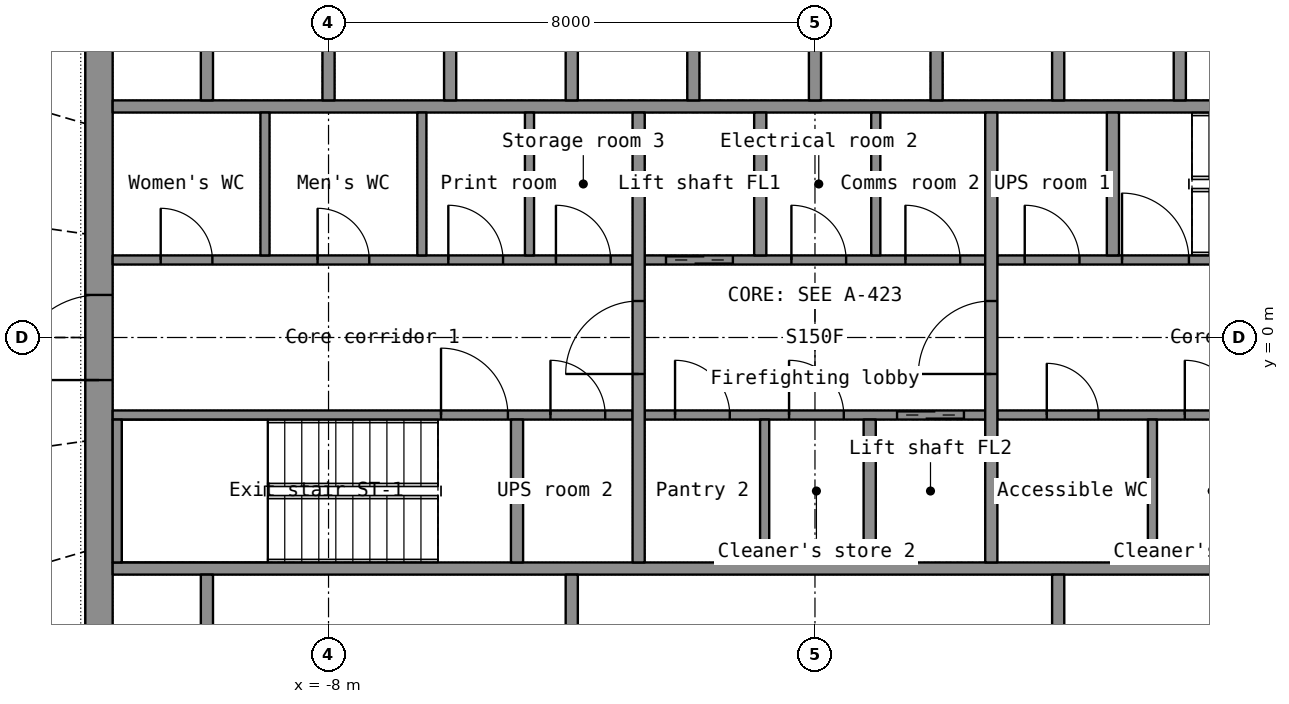
"""IFC4 building model, lengths in metres.
Left out: names, types, materials, properties, quantities, classifications, styles, units other than length and angle.
Written with IfcOpenShell. Run it as: python <this file> out.ifc"""

import sys

from ifc_helpers import new_model, si_unit, direction, frame, frame_2d, origin, place, context, subcontext, project, spatial, rectangle, extrude, element, fill, save


model = new_model("IFC4")
c1 = context("Model", 3, precision=1e-05, world=origin(), true_north=direction((0.0, 1.0)))
c2 = subcontext(c1, "Body", "Model", "MODEL_VIEW")
j1 = project(units=[si_unit("LENGTHUNIT", "METRE"), si_unit("PLANEANGLEUNIT", "RADIAN")], contexts=[c1])
p1 = place(None, origin())
s1 = spatial("IfcSite", under=j1, at=p1, CompositionType="ELEMENT")
p2 = place(p1, origin())
s2 = spatial("IfcBuilding", under=s1, at=p2, CompositionType="ELEMENT")
p3 = place(p2, frame((0.0, 0.0, 168.2)))
s3 = spatial("IfcBuildingStorey", under=s2, at=p3, CompositionType="ELEMENT", Elevation=168.2)
p4 = place(p3, frame((-11.775, -7.2, 0.0), z_axis=(0.0, 0.0, 1.0), x_axis=(0.0, 1.0, 0.0)))
e1 = element("IfcWall", 1, at=p4, inside=s3, PredefinedType="SHEAR", context=c2, shape_type="SweptSolid", body=[
    extrude(rectangle(XDim=14.4, YDim=0.45, at=frame_2d((7.2, 0.0))), origin(), (0.0, 0.0, 1.0), 3.3),
])
p5 = place(p4, frame((6.5, 0.0, 0.0)))
e2 = element("IfcOpeningElement", 2, at=p5, cuts=e1, PredefinedType="OPENING", context=c2, shape_type="SweptSolid", body=[
    extrude(rectangle(XDim=1.4, YDim=2.2, at=frame_2d((0.7, 1.1))), frame((0.0, 0.235, 0.0), z_axis=(0.0, -1.0, 0.0), x_axis=(1.0, 0.0, 0.0)), (0.0, 0.0, 1.0), 0.47),
])
for number, where, z_axis, x_axis in (
    (3, (-11.55, -3.8, 0.0), (0.0, 0.0, 1.0), (1.0, 0.0, 0.0)),
    (4, (-11.55, 3.8, 0.0), (0.0, 0.0, 1.0), (1.0, 0.0, 0.0)),
):
    element("IfcWall", number, at=place(p3, frame(where, z_axis=z_axis, x_axis=x_axis)), inside=s3, PredefinedType="SHEAR", context=c2, shape_type="SweptSolid", body=[
        extrude(rectangle(XDim=23.1, YDim=0.2, at=frame_2d((11.55, 0.0))), origin(), (0.0, 0.0, 1.0), 3.3),
    ])
p6 = place(p3, frame((-10.0, -6.75, 0.0), z_axis=(0.0, 0.0, 1.0), x_axis=(0.0, 1.0, 0.0)))
e5 = element("IfcWall", 5, at=p6, inside=s3, PredefinedType="SHEAR", context=c2, shape_type="SweptSolid", body=[
    extrude(rectangle(XDim=2.85, YDim=0.2, at=frame_2d((1.425, 0.0))), origin(), (0.0, 0.0, 1.0), 3.3),
])
for number, where, z_axis, x_axis in (
    (6, (-4.0, -6.75, 0.0), (0.0, 0.0, 1.0), (0.0, 1.0, 0.0)),
    (7, (4.0, -6.75, 0.0), (0.0, 0.0, 1.0), (0.0, 1.0, 0.0)),
):
    element("IfcWall", number, at=place(p3, frame(where, z_axis=z_axis, x_axis=x_axis)), inside=s3, PredefinedType="PARTITIONING", context=c2, shape_type="SweptSolid", body=[
        extrude(rectangle(XDim=2.85, YDim=0.2, at=frame_2d((1.425, 0.0))), origin(), (0.0, 0.0, 1.0), 3.3),
    ])
for number, where, z_axis, x_axis in (
    (8, (-10.0, 3.9, 0.0), (0.0, 0.0, 1.0), (0.0, 1.0, 0.0)),
    (9, (-8.0, 3.9, 0.0), (0.0, 0.0, 1.0), (0.0, 1.0, 0.0)),
    (10, (-6.0, 3.9, 0.0), (0.0, 0.0, 1.0), (0.0, 1.0, 0.0)),
    (11, (-4.0, 3.9, 0.0), (0.0, 0.0, 1.0), (0.0, 1.0, 0.0)),
    (12, (-2.0, 3.9, 0.0), (0.0, 0.0, 1.0), (0.0, 1.0, 0.0)),
    (13, (0.0, 3.9, 0.0), (0.0, 0.0, 1.0), (0.0, 1.0, 0.0)),
    (14, (2.0, 3.9, 0.0), (0.0, 0.0, 1.0), (0.0, 1.0, 0.0)),
    (15, (4.0, 3.9, 0.0), (0.0, 0.0, 1.0), (0.0, 1.0, 0.0)),
    (16, (6.0, 3.9, 0.0), (0.0, 0.0, 1.0), (0.0, 1.0, 0.0)),
):
    element("IfcWall", number, at=place(p3, frame(where, z_axis=z_axis, x_axis=x_axis)), inside=s3, PredefinedType="SHEAR", context=c2, shape_type="SweptSolid", body=[
        extrude(rectangle(XDim=2.85, YDim=0.2, at=frame_2d((1.425, 0.0))), origin(), (0.0, 0.0, 1.0), 3.3),
    ])
p7 = place(p3, frame((-11.55, -1.275, 0.0), z_axis=(0.0, 0.0, 1.0), x_axis=(1.0, 0.0, 0.0)))
e17 = element("IfcWall", 17, at=p7, inside=s3, PredefinedType="SHEAR", context=c2, shape_type="SweptSolid", body=[
    extrude(rectangle(XDim=8.55, YDim=0.15, at=frame_2d((4.275, 0.0))), origin(), (0.0, 0.0, 1.0), 3.3),
])
p8 = place(p7, frame((5.4, 0.0, 0.0)))
e18 = element("IfcOpeningElement", 18, at=p8, cuts=e17, PredefinedType="OPENING", context=c2, shape_type="SweptSolid", body=[
    extrude(rectangle(XDim=1.1, YDim=2.15, at=frame_2d((0.55, 1.075))), frame((0.0, 0.085, 0.0), z_axis=(0.0, -1.0, 0.0), x_axis=(1.0, 0.0, 0.0)), (0.0, 0.0, 1.0), 0.17),
])
p9 = place(p7, frame((7.2, 0.0, 0.0)))
e19 = element("IfcOpeningElement", 19, at=p9, cuts=e17, PredefinedType="OPENING", context=c2, shape_type="SweptSolid", body=[
    extrude(rectangle(XDim=0.9, YDim=2.1, at=frame_2d((0.45, 1.05))), frame((0.0, 0.085, 0.0), z_axis=(0.0, -1.0, 0.0), x_axis=(1.0, 0.0, 0.0)), (0.0, 0.0, 1.0), 0.17),
])
p10 = place(p3, frame((-2.8, -1.275, 0.0), z_axis=(0.0, 0.0, 1.0), x_axis=(1.0, 0.0, 0.0)))
e20 = element("IfcWall", 20, at=p10, inside=s3, PredefinedType="SHEAR", context=c2, shape_type="SweptSolid", body=[
    extrude(rectangle(XDim=5.6, YDim=0.15, at=frame_2d((2.8, 0.0))), origin(), (0.0, 0.0, 1.0), 3.3),
])
p11 = place(p10, frame((4.15, 0.0, 0.0)))
e21 = element("IfcOpeningElement", 21, at=p11, cuts=e20, PredefinedType="OPENING", context=c2, shape_type="SweptSolid", body=[
    extrude(rectangle(XDim=1.1, YDim=2.2, at=frame_2d((0.55, 1.1))), frame((0.0, 0.085, 0.0), z_axis=(0.0, -1.0, 0.0), x_axis=(1.0, 0.0, 0.0)), (0.0, 0.0, 1.0), 0.17),
])
p12 = place(p10, frame((0.499, 0.0, 0.0)))
e22 = element("IfcOpeningElement", 22, at=p12, cuts=e20, PredefinedType="OPENING", context=c2, shape_type="SweptSolid", body=[
    extrude(rectangle(XDim=0.9, YDim=2.1, at=frame_2d((0.45, 1.05))), frame((0.0, 0.085, 0.0), z_axis=(0.0, -1.0, 0.0), x_axis=(1.0, 0.0, 0.0)), (0.0, 0.0, 1.0), 0.17),
])
p13 = place(p10, frame((2.374, 0.0, 0.0)))
e23 = element("IfcOpeningElement", 23, at=p13, cuts=e20, PredefinedType="OPENING", context=c2, shape_type="SweptSolid", body=[
    extrude(rectangle(XDim=0.9, YDim=2.1, at=frame_2d((0.45, 1.05))), frame((0.0, 0.085, 0.0), z_axis=(0.0, -1.0, 0.0), x_axis=(1.0, 0.0, 0.0)), (0.0, 0.0, 1.0), 0.17),
])
p14 = place(p3, frame((3.0, -1.275, 0.0), z_axis=(0.0, 0.0, 1.0), x_axis=(1.0, 0.0, 0.0)))
e24 = element("IfcWall", 24, at=p14, inside=s3, PredefinedType="PARTITIONING", context=c2, shape_type="SweptSolid", body=[
    extrude(rectangle(XDim=8.55, YDim=0.15, at=frame_2d((4.275, 0.0))), origin(), (0.0, 0.0, 1.0), 3.3),
])
p15 = place(p14, frame((0.812, 0.0, 0.0)))
e25 = element("IfcOpeningElement", 25, at=p15, cuts=e24, PredefinedType="OPENING", context=c2, shape_type="SweptSolid", body=[
    extrude(rectangle(XDim=0.85, YDim=2.1, at=frame_2d((0.425, 1.05))), frame((0.0, 0.085, 0.0), z_axis=(0.0, -1.0, 0.0), x_axis=(1.0, 0.0, 0.0)), (0.0, 0.0, 1.0), 0.17),
])
p16 = place(p14, frame((3.083, 0.0, 0.0)))
e26 = element("IfcOpeningElement", 26, at=p16, cuts=e24, PredefinedType="OPENING", context=c2, shape_type="SweptSolid", body=[
    extrude(rectangle(XDim=0.9, YDim=2.1, at=frame_2d((0.45, 1.05))), frame((0.0, 0.085, 0.0), z_axis=(0.0, -1.0, 0.0), x_axis=(1.0, 0.0, 0.0)), (0.0, 0.0, 1.0), 0.17),
])
p17 = place(p14, frame((6.12, 0.0, 0.0)))
e27 = element("IfcOpeningElement", 27, at=p17, cuts=e24, PredefinedType="OPENING", context=c2, shape_type="SweptSolid", body=[
    extrude(rectangle(XDim=0.9, YDim=2.1, at=frame_2d((0.45, 1.05))), frame((0.0, 0.085, 0.0), z_axis=(0.0, -1.0, 0.0), x_axis=(1.0, 0.0, 0.0)), (0.0, 0.0, 1.0), 0.17),
])
p18 = place(p3, frame((-11.55, 1.275, 0.0), z_axis=(0.0, 0.0, 1.0), x_axis=(1.0, 0.0, 0.0)))
e28 = element("IfcWall", 28, at=p18, inside=s3, PredefinedType="PARTITIONING", context=c2, shape_type="SweptSolid", body=[
    extrude(rectangle(XDim=8.55, YDim=0.15, at=frame_2d((4.275, 0.0))), origin(), (0.0, 0.0, 1.0), 3.3),
])
p19 = place(p18, frame((0.79, 0.0, 0.0)))
e29 = element("IfcOpeningElement", 29, at=p19, cuts=e28, PredefinedType="OPENING", context=c2, shape_type="SweptSolid", body=[
    extrude(rectangle(XDim=0.85, YDim=2.1, at=frame_2d((0.425, 1.05))), frame((0.0, 0.085, 0.0), z_axis=(0.0, -1.0, 0.0), x_axis=(1.0, 0.0, 0.0)), (0.0, 0.0, 1.0), 0.17),
])
p20 = place(p18, frame((3.37, 0.0, 0.0)))
e30 = element("IfcOpeningElement", 30, at=p20, cuts=e28, PredefinedType="OPENING", context=c2, shape_type="SweptSolid", body=[
    extrude(rectangle(XDim=0.85, YDim=2.1, at=frame_2d((0.425, 1.05))), frame((0.0, 0.085, 0.0), z_axis=(0.0, -1.0, 0.0), x_axis=(1.0, 0.0, 0.0)), (0.0, 0.0, 1.0), 0.17),
])
p21 = place(p18, frame((5.52, 0.0, 0.0)))
e31 = element("IfcOpeningElement", 31, at=p21, cuts=e28, PredefinedType="OPENING", context=c2, shape_type="SweptSolid", body=[
    extrude(rectangle(XDim=0.9, YDim=2.1, at=frame_2d((0.45, 1.05))), frame((0.0, 0.085, 0.0), z_axis=(0.0, -1.0, 0.0), x_axis=(1.0, 0.0, 0.0)), (0.0, 0.0, 1.0), 0.17),
])
p22 = place(p18, frame((7.29, 0.0, 0.0)))
e32 = element("IfcOpeningElement", 32, at=p22, cuts=e28, PredefinedType="OPENING", context=c2, shape_type="SweptSolid", body=[
    extrude(rectangle(XDim=0.9, YDim=2.1, at=frame_2d((0.45, 1.05))), frame((0.0, 0.085, 0.0), z_axis=(0.0, -1.0, 0.0), x_axis=(1.0, 0.0, 0.0)), (0.0, 0.0, 1.0), 0.17),
])
p23 = place(p3, frame((-2.8, 1.275, 0.0), z_axis=(0.0, 0.0, 1.0), x_axis=(1.0, 0.0, 0.0)))
e33 = element("IfcWall", 33, at=p23, inside=s3, PredefinedType="SHEAR", context=c2, shape_type="SweptSolid", body=[
    extrude(rectangle(XDim=5.6, YDim=0.15, at=frame_2d((2.8, 0.0))), origin(), (0.0, 0.0, 1.0), 3.3),
])
p24 = place(p23, frame((0.35, 0.0, 0.0)))
e34 = element("IfcOpeningElement", 34, at=p24, cuts=e33, PredefinedType="OPENING", context=c2, shape_type="SweptSolid", body=[
    extrude(rectangle(XDim=1.1, YDim=2.2, at=frame_2d((0.55, 1.1))), frame((0.0, 0.085, 0.0), z_axis=(0.0, -1.0, 0.0), x_axis=(1.0, 0.0, 0.0)), (0.0, 0.0, 1.0), 0.17),
])
p25 = place(p23, frame((2.413, 0.0, 0.0)))
e35 = element("IfcOpeningElement", 35, at=p25, cuts=e33, PredefinedType="OPENING", context=c2, shape_type="SweptSolid", body=[
    extrude(rectangle(XDim=0.9, YDim=2.1, at=frame_2d((0.45, 1.05))), frame((0.0, 0.085, 0.0), z_axis=(0.0, -1.0, 0.0), x_axis=(1.0, 0.0, 0.0)), (0.0, 0.0, 1.0), 0.17),
])
p26 = place(p23, frame((4.288, 0.0, 0.0)))
e36 = element("IfcOpeningElement", 36, at=p26, cuts=e33, PredefinedType="OPENING", context=c2, shape_type="SweptSolid", body=[
    extrude(rectangle(XDim=0.9, YDim=2.1, at=frame_2d((0.45, 1.05))), frame((0.0, 0.085, 0.0), z_axis=(0.0, -1.0, 0.0), x_axis=(1.0, 0.0, 0.0)), (0.0, 0.0, 1.0), 0.17),
])
p27 = place(p3, frame((3.0, 1.275, 0.0), z_axis=(0.0, 0.0, 1.0), x_axis=(1.0, 0.0, 0.0)))
e37 = element("IfcWall", 37, at=p27, inside=s3, PredefinedType="SHEAR", context=c2, shape_type="SweptSolid", body=[
    extrude(rectangle(XDim=8.55, YDim=0.15, at=frame_2d((4.275, 0.0))), origin(), (0.0, 0.0, 1.0), 3.3),
])
p28 = place(p27, frame((2.05, 0.0, 0.0)))
e38 = element("IfcOpeningElement", 38, at=p28, cuts=e37, PredefinedType="OPENING", context=c2, shape_type="SweptSolid", body=[
    extrude(rectangle(XDim=1.1, YDim=2.15, at=frame_2d((0.55, 1.075))), frame((0.0, 0.085, 0.0), z_axis=(0.0, -1.0, 0.0), x_axis=(1.0, 0.0, 0.0)), (0.0, 0.0, 1.0), 0.17),
])
p29 = place(p27, frame((0.45, 0.0, 0.0)))
e39 = element("IfcOpeningElement", 39, at=p29, cuts=e37, PredefinedType="OPENING", context=c2, shape_type="SweptSolid", body=[
    extrude(rectangle(XDim=0.9, YDim=2.1, at=frame_2d((0.45, 1.05))), frame((0.0, 0.085, 0.0), z_axis=(0.0, -1.0, 0.0), x_axis=(1.0, 0.0, 0.0)), (0.0, 0.0, 1.0), 0.17),
])
p30 = place(p3, frame((-2.9, -3.7, 0.0), z_axis=(0.0, 0.0, 1.0), x_axis=(0.0, 1.0, 0.0)))
e40 = element("IfcWall", 40, at=p30, inside=s3, PredefinedType="SHEAR", context=c2, shape_type="SweptSolid", body=[
    extrude(rectangle(XDim=7.4, YDim=0.2, at=frame_2d((3.7, 0.0))), origin(), (0.0, 0.0, 1.0), 3.3),
])
p31 = place(p30, frame((3.1, 0.0, 0.0)))
e41 = element("IfcOpeningElement", 41, at=p31, cuts=e40, PredefinedType="OPENING", context=c2, shape_type="SweptSolid", body=[
    extrude(rectangle(XDim=1.2, YDim=2.2, at=frame_2d((0.6, 1.1))), frame((0.0, 0.11, 0.0), z_axis=(0.0, -1.0, 0.0), x_axis=(1.0, 0.0, 0.0)), (0.0, 0.0, 1.0), 0.22),
])
p32 = place(p3, frame((2.9, -3.7, 0.0), z_axis=(0.0, 0.0, 1.0), x_axis=(0.0, 1.0, 0.0)))
e42 = element("IfcWall", 42, at=p32, inside=s3, PredefinedType="SHEAR", context=c2, shape_type="SweptSolid", body=[
    extrude(rectangle(XDim=7.4, YDim=0.2, at=frame_2d((3.7, 0.0))), origin(), (0.0, 0.0, 1.0), 3.3),
])
p33 = place(p32, frame((3.1, 0.0, 0.0)))
e43 = element("IfcOpeningElement", 43, at=p33, cuts=e42, PredefinedType="OPENING", context=c2, shape_type="SweptSolid", body=[
    extrude(rectangle(XDim=1.2, YDim=2.2, at=frame_2d((0.6, 1.1))), frame((0.0, 0.11, 0.0), z_axis=(0.0, -1.0, 0.0), x_axis=(1.0, 0.0, 0.0)), (0.0, 0.0, 1.0), 0.22),
])
for number, where, z_axis, x_axis in (
    (44, (-0.9, 1.35, 0.0), (0.0, 0.0, 1.0), (0.0, 1.0, 0.0)),
    (45, (0.9, -3.7, 0.0), (0.0, 0.0, 1.0), (0.0, 1.0, 0.0)),
):
    element("IfcWall", number, at=place(p3, frame(where, z_axis=z_axis, x_axis=x_axis)), inside=s3, PredefinedType="SHEAR", context=c2, shape_type="SweptSolid", body=[
        extrude(rectangle(XDim=2.35, YDim=0.2, at=frame_2d((1.175, 0.0))), origin(), (0.0, 0.0, 1.0), 3.3),
    ])
p34 = place(p3, frame((-11.475, -3.7, 0.0), z_axis=(0.0, 0.0, 1.0), x_axis=(0.0, 1.0, 0.0)))
e46 = element("IfcWall", 46, at=p34, inside=s3, PredefinedType="SHEAR", context=c2, shape_type="SweptSolid", body=[
    extrude(rectangle(XDim=2.35, YDim=0.15, at=frame_2d((1.175, 0.0))), origin(), (0.0, 0.0, 1.0), 3.3),
])
for number, where, z_axis, x_axis in (
    (47, (-4.9, -3.7, 0.0), (0.0, 0.0, 1.0), (0.0, 1.0, 0.0)),
    (48, (4.9, 1.35, 0.0), (0.0, 0.0, 1.0), (0.0, 1.0, 0.0)),
):
    element("IfcWall", number, at=place(p3, frame(where, z_axis=z_axis, x_axis=x_axis)), inside=s3, PredefinedType="SHEAR", context=c2, shape_type="SweptSolid", body=[
        extrude(rectangle(XDim=2.35, YDim=0.2, at=frame_2d((1.175, 0.0))), origin(), (0.0, 0.0, 1.0), 3.3),
    ])
for number, where, z_axis, x_axis in (
    (49, (-9.045, 1.35, 0.0), (0.0, 0.0, 1.0), (0.0, 1.0, 0.0)),
    (50, (-6.465, 1.35, 0.0), (0.0, 0.0, 1.0), (0.0, 1.0, 0.0)),
    (51, (-4.695, 1.35, 0.0), (0.0, 0.0, 1.0), (0.0, 1.0, 0.0)),
    (52, (5.55, -3.7, 0.0), (0.0, 0.0, 1.0), (0.0, 1.0, 0.0)),
    (53, (1.0, 1.35, 0.0), (0.0, 0.0, 1.0), (0.0, 1.0, 0.0)),
    (54, (-0.827, -3.7, 0.0), (0.0, 0.0, 1.0), (0.0, 1.0, 0.0)),
):
    element("IfcWall", number, at=place(p3, frame(where, z_axis=z_axis, x_axis=x_axis)), inside=s3, PredefinedType="PARTITIONING", context=c2, shape_type="SweptSolid", body=[
        extrude(rectangle(XDim=2.35, YDim=0.15, at=frame_2d((1.175, 0.0))), origin(), (0.0, 0.0, 1.0), 3.3),
    ])
p35 = place(p5, origin())
e55 = element("IfcDoor", 55, at=p35, inside=s3, OperationType="DOUBLE_DOOR_SINGLE_SWING", PredefinedType="DOOR", context=c2, shape_type="SweptSolid", body=[
    extrude(rectangle(XDim=1.4, YDim=2.2, at=frame_2d((0.7, 1.1))), frame((0.0, 0.025, 0.0), z_axis=(0.0, -1.0, 0.0), x_axis=(1.0, 0.0, 0.0)), (0.0, 0.0, 1.0), 0.05),
])
fill(e2, e55)
p36 = place(p31, origin())
e56 = element("IfcDoor", 56, at=p36, inside=s3, OperationType="SINGLE_SWING_LEFT", PredefinedType="DOOR", context=c2, shape_type="SweptSolid", body=[
    extrude(rectangle(XDim=1.2, YDim=2.2, at=frame_2d((0.6, 1.1))), frame((0.0, 0.025, 0.0), z_axis=(0.0, -1.0, 0.0), x_axis=(1.0, 0.0, 0.0)), (0.0, 0.0, 1.0), 0.05),
])
fill(e41, e56)
p37 = place(p33, origin())
e57 = element("IfcDoor", 57, at=p37, inside=s3, OperationType="SINGLE_SWING_LEFT", PredefinedType="DOOR", context=c2, shape_type="SweptSolid", body=[
    extrude(rectangle(XDim=1.2, YDim=2.2, at=frame_2d((0.6, 1.1))), frame((0.0, 0.025, 0.0), z_axis=(0.0, -1.0, 0.0), x_axis=(1.0, 0.0, 0.0)), (0.0, 0.0, 1.0), 0.05),
])
fill(e43, e57)
p38 = place(p24, origin())
e58 = element("IfcDoor", 58, at=p38, inside=s3, OperationType="DOUBLE_DOOR_SLIDING", PredefinedType="DOOR", context=c2, shape_type="SweptSolid", body=[
    extrude(rectangle(XDim=1.1, YDim=2.2, at=frame_2d((0.55, 1.1))), frame((0.0, 0.025, 0.0), z_axis=(0.0, -1.0, 0.0), x_axis=(1.0, 0.0, 0.0)), (0.0, 0.0, 1.0), 0.05),
])
fill(e34, e58)
p39 = place(p11, origin())
e59 = element("IfcDoor", 59, at=p39, inside=s3, OperationType="DOUBLE_DOOR_SLIDING", PredefinedType="DOOR", context=c2, shape_type="SweptSolid", body=[
    extrude(rectangle(XDim=1.1, YDim=2.2, at=frame_2d((0.55, 1.1))), frame((0.0, 0.025, 0.0), z_axis=(0.0, -1.0, 0.0), x_axis=(1.0, 0.0, 0.0)), (0.0, 0.0, 1.0), 0.05),
])
fill(e21, e59)
p40 = place(p8, origin())
e60 = element("IfcDoor", 60, at=p40, inside=s3, OperationType="SINGLE_SWING_LEFT", PredefinedType="DOOR", context=c2, shape_type="SweptSolid", body=[
    extrude(rectangle(XDim=1.1, YDim=2.15, at=frame_2d((0.55, 1.075))), frame((0.0, 0.025, 0.0), z_axis=(0.0, -1.0, 0.0), x_axis=(1.0, 0.0, 0.0)), (0.0, 0.0, 1.0), 0.05),
])
fill(e18, e60)
p41 = place(p28, origin())
e61 = element("IfcDoor", 61, at=p41, inside=s3, OperationType="SINGLE_SWING_LEFT", PredefinedType="DOOR", context=c2, shape_type="SweptSolid", body=[
    extrude(rectangle(XDim=1.1, YDim=2.15, at=frame_2d((0.55, 1.075))), frame((0.0, 0.025, 0.0), z_axis=(0.0, -1.0, 0.0), x_axis=(1.0, 0.0, 0.0)), (0.0, 0.0, 1.0), 0.05),
])
fill(e38, e61)
p42 = place(p19, origin())
e62 = element("IfcDoor", 62, at=p42, inside=s3, OperationType="SINGLE_SWING_LEFT", PredefinedType="DOOR", context=c2, shape_type="SweptSolid", body=[
    extrude(rectangle(XDim=0.85, YDim=2.1, at=frame_2d((0.425, 1.05))), frame((0.0, 0.025, 0.0), z_axis=(0.0, -1.0, 0.0), x_axis=(1.0, 0.0, 0.0)), (0.0, 0.0, 1.0), 0.05),
])
fill(e29, e62)
p43 = place(p20, origin())
e63 = element("IfcDoor", 63, at=p43, inside=s3, OperationType="SINGLE_SWING_LEFT", PredefinedType="DOOR", context=c2, shape_type="SweptSolid", body=[
    extrude(rectangle(XDim=0.85, YDim=2.1, at=frame_2d((0.425, 1.05))), frame((0.0, 0.025, 0.0), z_axis=(0.0, -1.0, 0.0), x_axis=(1.0, 0.0, 0.0)), (0.0, 0.0, 1.0), 0.05),
])
fill(e30, e63)
p44 = place(p21, origin())
e64 = element("IfcDoor", 64, at=p44, inside=s3, OperationType="SINGLE_SWING_LEFT", PredefinedType="DOOR", context=c2, shape_type="SweptSolid", body=[
    extrude(rectangle(XDim=0.9, YDim=2.1, at=frame_2d((0.45, 1.05))), frame((0.0, 0.025, 0.0), z_axis=(0.0, -1.0, 0.0), x_axis=(1.0, 0.0, 0.0)), (0.0, 0.0, 1.0), 0.05),
])
fill(e31, e64)
p45 = place(p22, origin())
e65 = element("IfcDoor", 65, at=p45, inside=s3, OperationType="SINGLE_SWING_LEFT", PredefinedType="DOOR", context=c2, shape_type="SweptSolid", body=[
    extrude(rectangle(XDim=0.9, YDim=2.1, at=frame_2d((0.45, 1.05))), frame((0.0, 0.025, 0.0), z_axis=(0.0, -1.0, 0.0), x_axis=(1.0, 0.0, 0.0)), (0.0, 0.0, 1.0), 0.05),
])
fill(e32, e65)
p46 = place(p15, origin())
e66 = element("IfcDoor", 66, at=p46, inside=s3, OperationType="SINGLE_SWING_LEFT", PredefinedType="DOOR", context=c2, shape_type="SweptSolid", body=[
    extrude(rectangle(XDim=0.85, YDim=2.1, at=frame_2d((0.425, 1.05))), frame((0.0, 0.025, 0.0), z_axis=(0.0, -1.0, 0.0), x_axis=(1.0, 0.0, 0.0)), (0.0, 0.0, 1.0), 0.05),
])
fill(e25, e66)
p47 = place(p16, origin())
e67 = element("IfcDoor", 67, at=p47, inside=s3, OperationType="SINGLE_SWING_LEFT", PredefinedType="DOOR", context=c2, shape_type="SweptSolid", body=[
    extrude(rectangle(XDim=0.9, YDim=2.1, at=frame_2d((0.45, 1.05))), frame((0.0, 0.025, 0.0), z_axis=(0.0, -1.0, 0.0), x_axis=(1.0, 0.0, 0.0)), (0.0, 0.0, 1.0), 0.05),
])
fill(e26, e67)
p48 = place(p25, origin())
e68 = element("IfcDoor", 68, at=p48, inside=s3, OperationType="SINGLE_SWING_LEFT", PredefinedType="DOOR", context=c2, shape_type="SweptSolid", body=[
    extrude(rectangle(XDim=0.9, YDim=2.1, at=frame_2d((0.45, 1.05))), frame((0.0, 0.025, 0.0), z_axis=(0.0, -1.0, 0.0), x_axis=(1.0, 0.0, 0.0)), (0.0, 0.0, 1.0), 0.05),
])
fill(e35, e68)
p49 = place(p26, origin())
e69 = element("IfcDoor", 69, at=p49, inside=s3, OperationType="SINGLE_SWING_LEFT", PredefinedType="DOOR", context=c2, shape_type="SweptSolid", body=[
    extrude(rectangle(XDim=0.9, YDim=2.1, at=frame_2d((0.45, 1.05))), frame((0.0, 0.025, 0.0), z_axis=(0.0, -1.0, 0.0), x_axis=(1.0, 0.0, 0.0)), (0.0, 0.0, 1.0), 0.05),
])
fill(e36, e69)
p50 = place(p12, origin())
e70 = element("IfcDoor", 70, at=p50, inside=s3, OperationType="SINGLE_SWING_LEFT", PredefinedType="DOOR", context=c2, shape_type="SweptSolid", body=[
    extrude(rectangle(XDim=0.9, YDim=2.1, at=frame_2d((0.45, 1.05))), frame((0.0, 0.025, 0.0), z_axis=(0.0, -1.0, 0.0), x_axis=(1.0, 0.0, 0.0)), (0.0, 0.0, 1.0), 0.05),
])
fill(e22, e70)
p51 = place(p13, origin())
e71 = element("IfcDoor", 71, at=p51, inside=s3, OperationType="SINGLE_SWING_LEFT", PredefinedType="DOOR", context=c2, shape_type="SweptSolid", body=[
    extrude(rectangle(XDim=0.9, YDim=2.1, at=frame_2d((0.45, 1.05))), frame((0.0, 0.025, 0.0), z_axis=(0.0, -1.0, 0.0), x_axis=(1.0, 0.0, 0.0)), (0.0, 0.0, 1.0), 0.05),
])
fill(e23, e71)
p52 = place(p29, origin())
e72 = element("IfcDoor", 72, at=p52, inside=s3, OperationType="SINGLE_SWING_LEFT", PredefinedType="DOOR", context=c2, shape_type="SweptSolid", body=[
    extrude(rectangle(XDim=0.9, YDim=2.1, at=frame_2d((0.45, 1.05))), frame((0.0, 0.025, 0.0), z_axis=(0.0, -1.0, 0.0), x_axis=(1.0, 0.0, 0.0)), (0.0, 0.0, 1.0), 0.05),
])
fill(e39, e72)
p53 = place(p9, origin())
e73 = element("IfcDoor", 73, at=p53, inside=s3, OperationType="SINGLE_SWING_LEFT", PredefinedType="DOOR", context=c2, shape_type="SweptSolid", body=[
    extrude(rectangle(XDim=0.9, YDim=2.1, at=frame_2d((0.45, 1.05))), frame((0.0, 0.025, 0.0), z_axis=(0.0, -1.0, 0.0), x_axis=(1.0, 0.0, 0.0)), (0.0, 0.0, 1.0), 0.05),
])
fill(e19, e73)
save(model, sys.argv[1])
